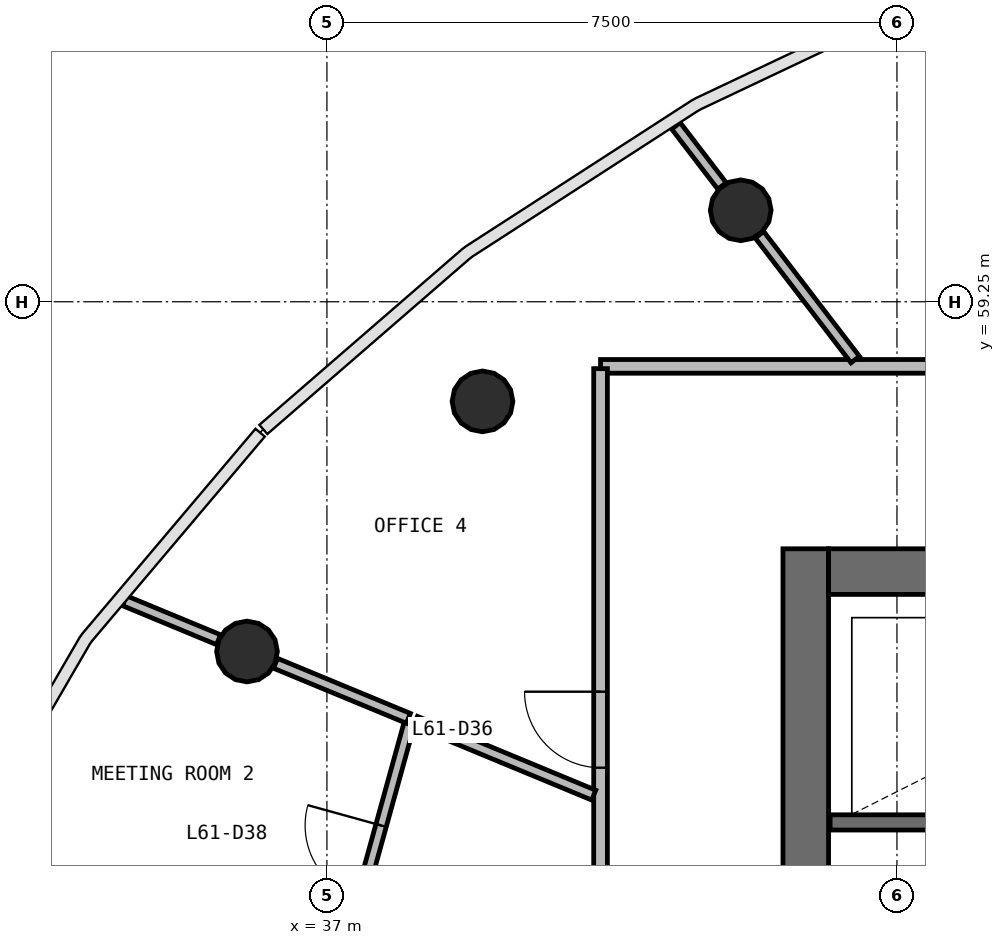
"""IFC4 building model, lengths in metres.
Left out: names, types, materials, properties, quantities, classifications, styles, units other than length and angle.
Written with IfcOpenShell. Run it as: python <this file> out.ifc"""

import sys

from ifc_helpers import new_model, si_unit, direction, frame, frame_2d, origin, origin_2d, place, context, subcontext, project, spatial, rectangle, circle, extrude, source, transform, mapped, element, fill, save


model = new_model("IFC4")
c1 = context("Model", 3, precision=1e-05, world=origin(), true_north=direction((0.0, 1.0)))
c2 = subcontext(c1, "Body", "Model", "MODEL_VIEW")
j1 = project(units=[si_unit("LENGTHUNIT", "METRE"), si_unit("PLANEANGLEUNIT", "RADIAN")], contexts=[c1])
p1 = place(None, origin())
s1 = spatial("IfcSite", under=j1, at=p1, CompositionType="ELEMENT")
p2 = place(p1, origin())
s2 = spatial("IfcBuilding", under=s1, at=p2, CompositionType="ELEMENT")
p3 = place(p2, frame((0.0, 0.0, 250.1)))
s3 = spatial("IfcBuildingStorey", under=s2, at=p3, CompositionType="ELEMENT", Elevation=250.1)
p4 = place(p3, frame((43.3, 56.0, 0.0), z_axis=(0.0, 0.0, 1.0), x_axis=(0.0, -1.0, 0.0)))
e1 = element("IfcWall", 1, at=p4, inside=s3, PredefinedType="SHEAR", context=c2, shape_type="SweptSolid", body=[
    extrude(rectangle(XDim=16.0, YDim=0.6, at=frame_2d((8.0, 0.0))), origin(), (0.0, 0.0, 1.0), 3.9),
])
p5 = place(p4, frame((7.1, 0.0, 0.0)))
e2 = element("IfcOpeningElement", 2, at=p5, cuts=e1, PredefinedType="OPENING", context=c2, shape_type="SweptSolid", body=[
    extrude(rectangle(XDim=1.8, YDim=2.1, at=frame_2d((0.9, 1.05))), frame((0.0, 0.31, 0.0), z_axis=(0.0, -1.0, 0.0), x_axis=(1.0, 0.0, 0.0)), (0.0, 0.0, 1.0), 0.62),
])
p6 = place(p3, frame((60.4, 55.7, 0.0), z_axis=(0.0, 0.0, 1.0), x_axis=(-1.0, 0.0, 0.0)))
e3 = element("IfcWall", 3, at=p6, inside=s3, PredefinedType="SHEAR", context=c2, shape_type="SweptSolid", body=[
    extrude(rectangle(XDim=16.8, YDim=0.6, at=frame_2d((8.4, 0.0))), origin(), (0.0, 0.0, 1.0), 3.9),
])
p7 = place(p6, frame((0.4, 0.0, 0.0)))
e4 = element("IfcOpeningElement", 4, at=p7, cuts=e3, PredefinedType="OPENING", context=c2, shape_type="SweptSolid", body=[
    extrude(rectangle(XDim=1.1, YDim=2.1, at=frame_2d((0.55, 1.05))), frame((0.0, 0.31, 0.0), z_axis=(0.0, -1.0, 0.0), x_axis=(1.0, 0.0, 0.0)), (0.0, 0.0, 1.0), 0.62),
])
p8 = place(p6, frame((10.3, 0.0, 0.0)))
e5 = element("IfcOpeningElement", 5, at=p8, cuts=e3, PredefinedType="OPENING", context=c2, shape_type="SweptSolid", body=[
    extrude(rectangle(XDim=1.2, YDim=2.1, at=frame_2d((0.6, 1.05))), frame((0.0, 0.31, 0.0), z_axis=(0.0, -1.0, 0.0), x_axis=(1.0, 0.0, 0.0)), (0.0, 0.0, 1.0), 0.62),
])
p9 = place(p6, frame((7.25, 0.0, 0.0)))
e6 = element("IfcOpeningElement", 6, at=p9, cuts=e3, PredefinedType="OPENING", context=c2, shape_type="SweptSolid", body=[
    extrude(rectangle(XDim=1.1, YDim=2.1, at=frame_2d((0.55, 1.05))), frame((0.0, 0.31, 0.0), z_axis=(0.0, -1.0, 0.0), x_axis=(1.0, 0.0, 0.0)), (0.0, 0.0, 1.0), 0.62),
])
m1 = source(origin(), c2, "Body", "SweptSolid", [
    extrude(circle(Radius=0.4, at=origin_2d()), origin(), (0.0, 0.0, 1.0), 3.9),
])
for number, where, z_axis, x_axis in (
    (7, (42.444, 60.453, 0.0), (0.0, 0.0, 1.0), (1.0, 0.0, 0.0)),
    (8, (39.047, 57.939, 0.0), (0.0, 0.0, 1.0), (1.0, 0.0, 0.0)),
    (9, (35.948, 54.649, 0.0), (0.0, 0.0, 1.0), (1.0, 0.0, 0.0)),
):
    element("IfcColumn", number, at=place(p3, frame(where, z_axis=z_axis, x_axis=x_axis)), inside=s3, PredefinedType="COLUMN", context=c2, shape_type="MappedRepresentation", body=[
        mapped(m1, transform((0.0, 0.0, 0.0), scale=1.0)),
    ])
p10 = place(p3, frame((43.62, 52.4, 0.0), z_axis=(0.0, 0.0, 1.0), x_axis=(1.0, 0.0, 0.0)))
e10 = element("IfcWall", 10, at=p10, inside=s3, PredefinedType="SOLIDWALL", context=c2, shape_type="SweptSolid", body=[
    extrude(rectangle(XDim=6.78, YDim=0.2, at=frame_2d((3.39, 0.0))), origin(), (0.0, 0.0, 1.0), 3.58),
])
p11 = place(p3, frame((40.6, 58.4, 0.0), z_axis=(0.0, 0.0, 1.0), x_axis=(1.0, 0.0, 0.0)))
e11 = element("IfcWall", 11, at=p11, inside=s3, PredefinedType="PARTITIONING", context=c2, shape_type="SweptSolid", body=[
    extrude(rectangle(XDim=22.8, YDim=0.18, at=frame_2d((11.4, 0.0))), origin(), (0.0, 0.0, 1.0), 2.88),
])
p12 = place(p11, frame((16.15, 0.0, 0.0)))
e12 = element("IfcOpeningElement", 12, at=p12, cuts=e11, PredefinedType="OPENING", context=c2, shape_type="SweptSolid", body=[
    extrude(rectangle(XDim=1.0, YDim=2.1, at=frame_2d((0.5, 1.05))), frame((0.0, 0.1, 0.0), z_axis=(0.0, -1.0, 0.0), x_axis=(1.0, 0.0, 0.0)), (0.0, 0.0, 1.0), 0.2),
])
p13 = place(p11, frame((10.95, 0.0, 0.0)))
e13 = element("IfcOpeningElement", 13, at=p13, cuts=e11, PredefinedType="OPENING", context=c2, shape_type="SweptSolid", body=[
    extrude(rectangle(XDim=1.0, YDim=2.1, at=frame_2d((0.5, 1.05))), frame((0.0, 0.1, 0.0), z_axis=(0.0, -1.0, 0.0), x_axis=(1.0, 0.0, 0.0)), (0.0, 0.0, 1.0), 0.2),
])
p14 = place(p11, frame((8.75, 0.0, 0.0)))
e14 = element("IfcOpeningElement", 14, at=p14, cuts=e11, PredefinedType="OPENING", context=c2, shape_type="SweptSolid", body=[
    extrude(rectangle(XDim=1.0, YDim=2.1, at=frame_2d((0.5, 1.05))), frame((0.0, 0.1, 0.0), z_axis=(0.0, -1.0, 0.0), x_axis=(1.0, 0.0, 0.0)), (0.0, 0.0, 1.0), 0.2),
])
p15 = place(p3, frame((40.6, 37.63, 0.0), z_axis=(0.0, 0.0, 1.0), x_axis=(0.0, 1.0, 0.0)))
e15 = element("IfcWall", 15, at=p15, inside=s3, PredefinedType="PARTITIONING", context=c2, shape_type="SweptSolid", body=[
    extrude(rectangle(XDim=20.74, YDim=0.18, at=frame_2d((10.37, 0.0))), origin(), (0.0, 0.0, 1.0), 2.88),
])
p16 = place(p15, frame((7.79, 0.0, 0.0)))
e16 = element("IfcOpeningElement", 16, at=p16, cuts=e15, PredefinedType="OPENING", context=c2, shape_type="SweptSolid", body=[
    extrude(rectangle(XDim=0.9, YDim=2.1, at=frame_2d((0.45, 1.05))), frame((0.0, 0.1, 0.0), z_axis=(0.0, -1.0, 0.0), x_axis=(1.0, 0.0, 0.0)), (0.0, 0.0, 1.0), 0.2),
])
p17 = place(p15, frame((4.39, 0.0, 0.0)))
e17 = element("IfcOpeningElement", 17, at=p17, cuts=e15, PredefinedType="OPENING", context=c2, shape_type="SweptSolid", body=[
    extrude(rectangle(XDim=0.9, YDim=2.1, at=frame_2d((0.45, 1.05))), frame((0.0, 0.1, 0.0), z_axis=(0.0, -1.0, 0.0), x_axis=(1.0, 0.0, 0.0)), (0.0, 0.0, 1.0), 0.2),
])
p18 = place(p15, frame((15.49, 0.0, 0.0)))
e18 = element("IfcOpeningElement", 18, at=p18, cuts=e15, PredefinedType="OPENING", context=c2, shape_type="SweptSolid", body=[
    extrude(rectangle(XDim=1.0, YDim=2.1, at=frame_2d((0.5, 1.05))), frame((0.0, 0.1, 0.0), z_axis=(0.0, -1.0, 0.0), x_axis=(1.0, 0.0, 0.0)), (0.0, 0.0, 1.0), 0.2),
])
p19 = place(p15, frame((9.89, 0.0, 0.0)))
e19 = element("IfcOpeningElement", 19, at=p19, cuts=e15, PredefinedType="OPENING", context=c2, shape_type="SweptSolid", body=[
    extrude(rectangle(XDim=1.0, YDim=2.1, at=frame_2d((0.5, 1.05))), frame((0.0, 0.1, 0.0), z_axis=(0.0, -1.0, 0.0), x_axis=(1.0, 0.0, 0.0)), (0.0, 0.0, 1.0), 0.2),
])
p20 = place(p3, frame((37.059, 49.997, 0.0), z_axis=(0.0, 0.0, 1.0), x_axis=(0.266530407872, 0.963826510156, 0.0)))
e20 = element("IfcWall", 20, at=p20, inside=s3, PredefinedType="PARTITIONING", context=c2, shape_type="SweptSolid", body=[
    extrude(rectangle(XDim=3.902, YDim=0.14, at=frame_2d((1.951, 0.0))), origin(), (0.0, 0.0, 1.0), 2.88),
])
p21 = place(p20, frame((1.452, 0.0, 0.0)))
e21 = element("IfcOpeningElement", 21, at=p21, cuts=e20, PredefinedType="OPENING", context=c2, shape_type="SweptSolid", body=[
    extrude(rectangle(XDim=1.0, YDim=2.1, at=frame_2d((0.5, 1.05))), frame((0.0, 0.08, 0.0), z_axis=(0.0, -1.0, 0.0), x_axis=(1.0, 0.0, 0.0)), (0.0, 0.0, 1.0), 0.16),
])
p22 = place(p3, frame((40.51, 52.759, 0.0), z_axis=(0.0, 0.0, 1.0), x_axis=(-0.923857420899, 0.382736810157, 0.0)))
e22 = element("IfcWall", 22, at=p22, inside=s3, PredefinedType="PARTITIONING", context=c2, shape_type="SweptSolid", body=[
    extrude(rectangle(XDim=2.539, YDim=0.14, at=frame_2d((1.27, 0.0))), origin(), (0.0, 0.0, 1.0), 2.88),
])
p23 = place(p3, frame((43.951, 58.49, 0.0), z_axis=(0.0, 0.0, 1.0), x_axis=(-0.608701397958, 0.793399400128, 0.0)))
e23 = element("IfcWall", 23, at=p23, inside=s3, PredefinedType="PARTITIONING", context=c2, shape_type="SweptSolid", body=[
    extrude(rectangle(XDim=2.07, YDim=0.14, at=frame_2d((1.035, 0.0))), origin(), (0.0, 0.0, 1.0), 2.88),
])
p24 = place(p3, frame((38.072, 53.769, 0.0), z_axis=(0.0, 0.0, 1.0), x_axis=(-0.923834462885, 0.382792221952, 0.0)))
e24 = element("IfcWall", 24, at=p24, inside=s3, PredefinedType="PARTITIONING", context=c2, shape_type="SweptSolid", body=[
    extrude(rectangle(XDim=1.893, YDim=0.14, at=frame_2d((0.947, 0.0))), origin(), (0.0, 0.0, 1.0), 2.88),
])
p25 = place(p3, frame((35.574, 54.804, 0.0), z_axis=(0.0, 0.0, 1.0), x_axis=(-0.923888145957, 0.382662637005, 0.0)))
e25 = element("IfcWall", 25, at=p25, inside=s3, PredefinedType="PARTITIONING", context=c2, shape_type="SweptSolid", body=[
    extrude(rectangle(XDim=1.341, YDim=0.14, at=frame_2d((0.67, 0.0))), origin(), (0.0, 0.0, 1.0), 2.88),
])
p26 = place(p3, frame((42.198, 60.774, 0.0), z_axis=(0.0, 0.0, 1.0), x_axis=(-0.608704056843, 0.793397360207, 0.0)))
e26 = element("IfcWall", 26, at=p26, inside=s3, PredefinedType="PARTITIONING", context=c2, shape_type="SweptSolid", body=[
    extrude(rectangle(XDim=0.997, YDim=0.14, at=frame_2d((0.498, 0.0))), origin(), (0.0, 0.0, 1.0), 2.88),
])
m2 = source(origin(), c2, "Body", "SweptSolid", [
    extrude(rectangle(XDim=1.0, YDim=2.1, at=frame_2d((0.5, 1.05))), frame((0.0, 0.025, 0.0), z_axis=(0.0, -1.0, 0.0), x_axis=(1.0, 0.0, 0.0)), (0.0, 0.0, 1.0), 0.05),
])
p27 = place(p18, origin())
e27 = element("IfcDoor", 27, at=p27, inside=s3, OperationType="SINGLE_SWING_RIGHT", PredefinedType="DOOR", context=c2, shape_type="MappedRepresentation", body=[
    mapped(m2, transform((0.0, 0.0, 0.0), scale=1.0)),
])
fill(e18, e27)
p28 = place(p21, origin())
e28 = element("IfcDoor", 28, at=p28, inside=s3, OperationType="SINGLE_SWING_RIGHT", PredefinedType="DOOR", context=c2, shape_type="MappedRepresentation", body=[
    mapped(m2, transform((0.0, 0.0, 0.0), scale=1.0)),
])
fill(e21, e28)
save(model, sys.argv[1])
